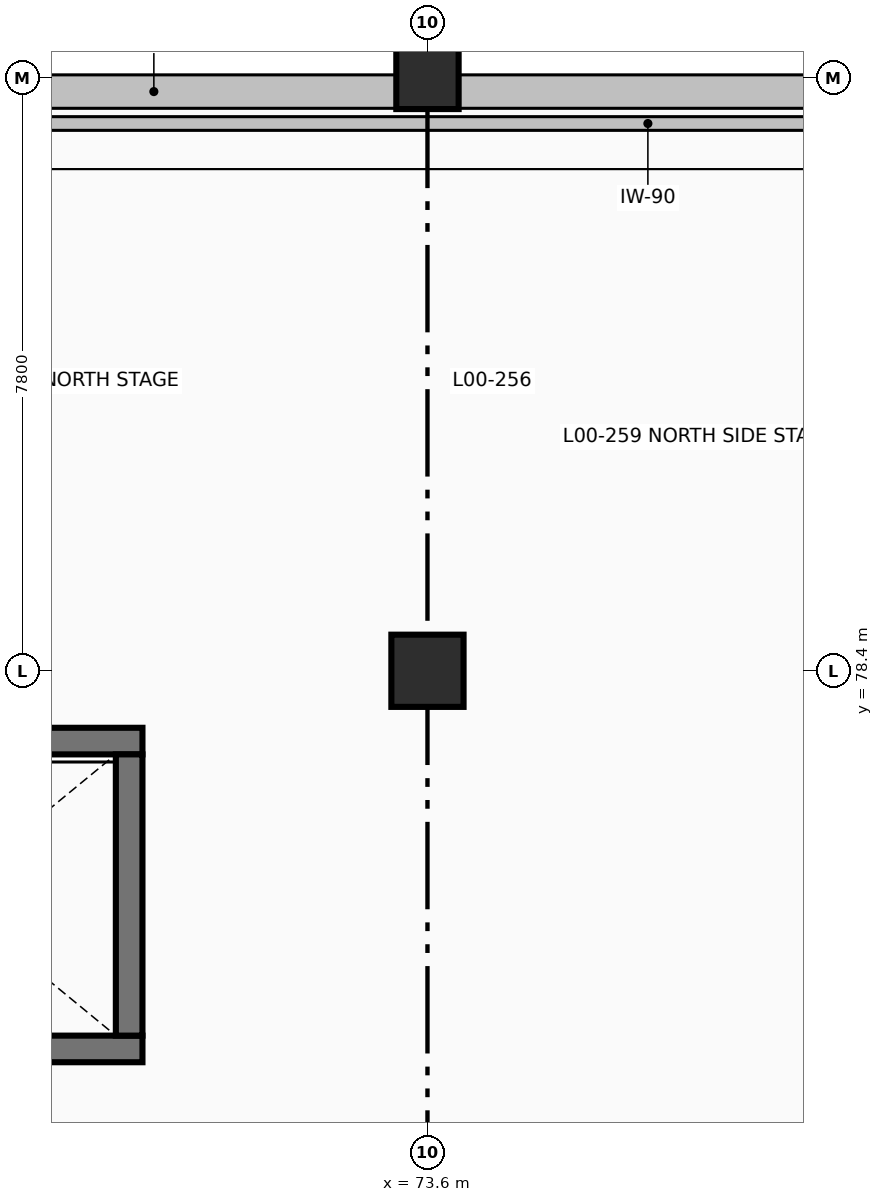
"""IFC4 building model, lengths in metres.
Left out: names, types, materials, properties, quantities, classifications, styles, units other than length and angle.
Written with IfcOpenShell. Run it as: python <this file> out.ifc"""

import sys

from ifc_helpers import new_model, si_unit, direction, frame, frame_2d, origin, origin_2d, place, context, subcontext, project, spatial, rectangle, extrude, element, save


model = new_model("IFC4")
c1 = context("Model", 3, precision=1e-05, world=origin(), true_north=direction((0.0, 1.0)))
c2 = subcontext(c1, "Body", "Model", "MODEL_VIEW")
j1 = project(units=[si_unit("LENGTHUNIT", "METRE"), si_unit("PLANEANGLEUNIT", "RADIAN")], contexts=[c1])
p1 = place(None, origin())
s1 = spatial("IfcSite", under=j1, at=p1, CompositionType="ELEMENT")
p2 = place(p1, origin())
s2 = spatial("IfcBuilding", under=s1, at=p2, CompositionType="ELEMENT")
p3 = place(p2, origin())
s3 = spatial("IfcBuildingStorey", under=s2, at=p3, CompositionType="ELEMENT", Elevation=0.0)
p4 = place(p3, frame((73.6, 78.4, 0.0), z_axis=(0.0, 0.0, 1.0), x_axis=(1.0, 0.0, 0.0)))
e1 = element("IfcColumn", 1, at=p4, inside=s3, PredefinedType="COLUMN", context=c2, shape_type="SweptSolid", body=[
    extrude(rectangle(XDim=0.95, YDim=0.95, at=origin_2d()), origin(), (0.0, 0.0, 1.0), 5.4),
])
p5 = place(p3, frame((73.6, 86.2, 0.0), z_axis=(0.0, 0.0, 1.0), x_axis=(1.0, 0.0, 0.0)))
e2 = element("IfcColumn", 2, at=p5, inside=s3, PredefinedType="COLUMN", context=c2, shape_type="SweptSolid", body=[
    extrude(rectangle(XDim=0.82, YDim=0.82, at=origin_2d()), origin(), (0.0, 0.0, 1.0), 5.4),
])
for number, where, z_axis, x_axis in (
    (3, (61.45, 73.425, 0.0), (0.0, 0.0, 1.0), (1.0, 0.0, 0.0)),
    (4, (69.85, 77.475, 0.0), (0.0, 0.0, 1.0), (-1.0, 0.0, 0.0)),
):
    element("IfcWall", number, at=place(p3, frame(where, z_axis=z_axis, x_axis=x_axis)), inside=s3, PredefinedType="SHEAR", context=c2, shape_type="SweptSolid", body=[
        extrude(rectangle(XDim=8.4, YDim=0.35, at=frame_2d((4.2, 0.0))), origin(), (0.0, 0.0, 1.0), 5.1),
    ])
p6 = place(p3, frame((69.675, 77.3, 0.0), z_axis=(0.0, 0.0, 1.0), x_axis=(0.0, -1.0, 0.0)))
e5 = element("IfcWall", 5, at=p6, inside=s3, PredefinedType="SHEAR", context=c2, shape_type="SweptSolid", body=[
    extrude(rectangle(XDim=3.7, YDim=0.35, at=frame_2d((1.85, 0.0))), origin(), (0.0, 0.0, 1.0), 5.1),
])
for number, where, z_axis, x_axis in (
    (6, (66.81, 86.02, 0.0), (0.0, 0.0, 1.0), (1.0, 0.0, 0.0)),
    (7, (74.01, 86.02, 0.0), (0.0, 0.0, 1.0), (1.0, 0.0, 0.0)),
):
    element("IfcWall", number, at=place(p3, frame(where, z_axis=z_axis, x_axis=x_axis)), inside=s3, PredefinedType="SOLIDWALL", context=c2, shape_type="SweptSolid", body=[
        extrude(rectangle(XDim=6.38, YDim=0.44, at=frame_2d((3.19, 0.0))), origin(), (0.0, 0.0, 1.0), 4.342),
    ])
p7 = place(p3, frame((66.6, 85.6, 0.0), z_axis=(0.0, 0.0, 1.0), x_axis=(1.0, 0.0, 0.0)))
e8 = element("IfcWall", 8, at=p7, inside=s3, PredefinedType="PARTITIONING", context=c2, shape_type="SweptSolid", body=[
    extrude(rectangle(XDim=19.8, YDim=0.18, at=frame_2d((9.9, 0.0))), origin(), (0.0, 0.0, 1.0), 5.092),
])
save(model, sys.argv[1])
